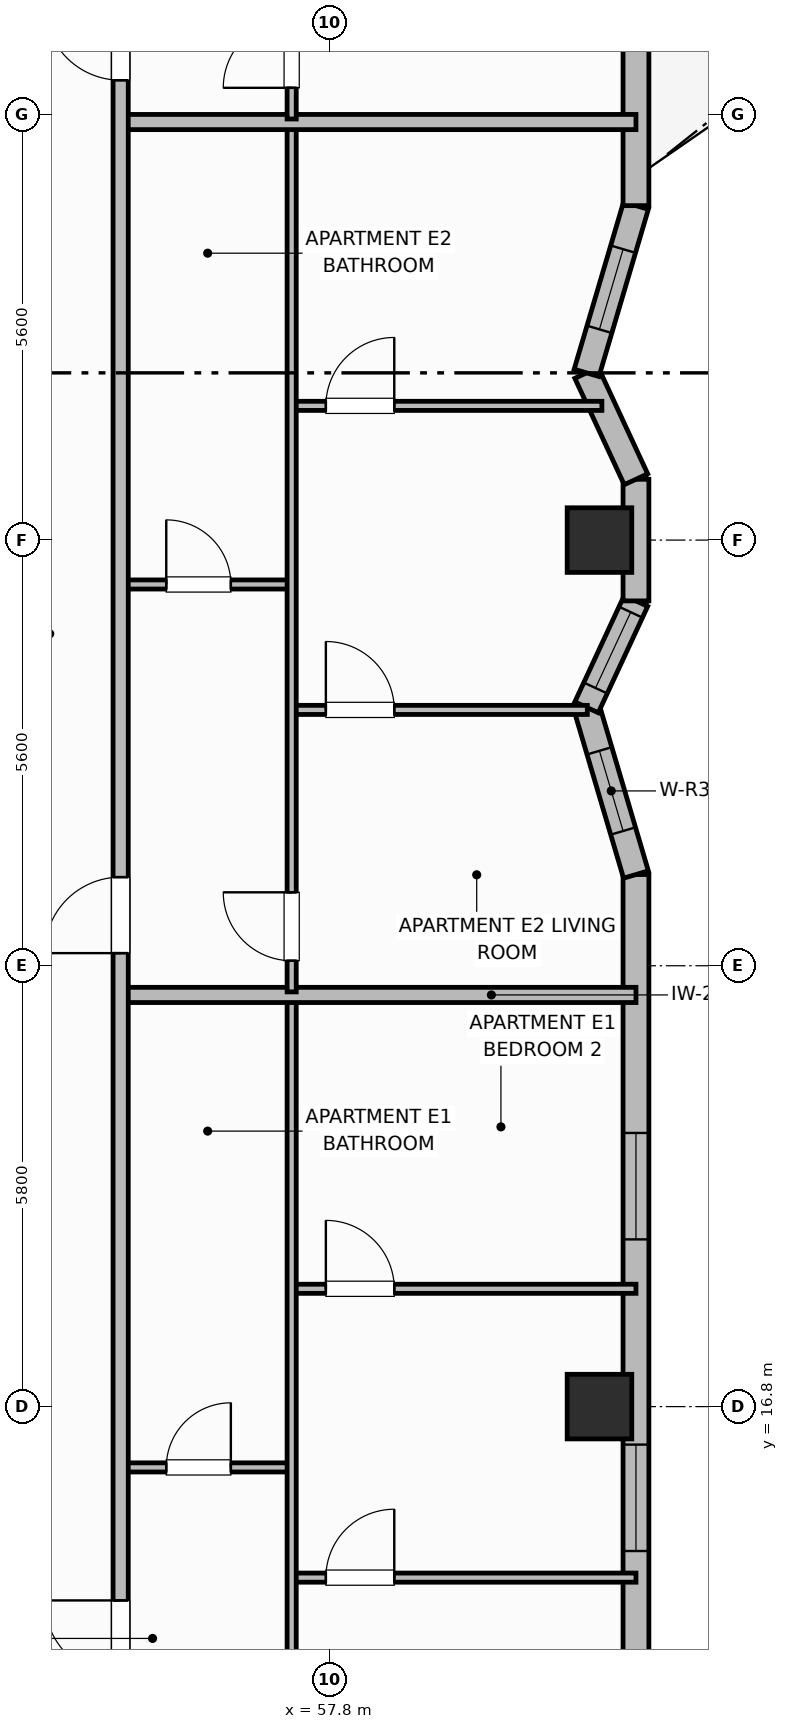
"""IFC4 building model, lengths in metres.
Left out: names, types, materials, properties, quantities, classifications, styles, units other than length and angle.
Written with IfcOpenShell. Run it as: python <this file> out.ifc"""

import sys

from ifc_helpers import new_model, si_unit, direction, frame, frame_2d, origin, origin_2d, place, context, subcontext, project, spatial, rectangle, extrude, element, fill, save


model = new_model("IFC4")
c1 = context("Model", 3, precision=1e-05, world=origin(), true_north=direction((0.0, 1.0)))
c2 = subcontext(c1, "Body", "Model", "MODEL_VIEW")
j1 = project(units=[si_unit("LENGTHUNIT", "METRE"), si_unit("PLANEANGLEUNIT", "RADIAN")], contexts=[c1])
p1 = place(None, origin())
s1 = spatial("IfcSite", under=j1, at=p1, CompositionType="ELEMENT")
p2 = place(p1, origin())
s2 = spatial("IfcBuilding", under=s1, at=p2, CompositionType="ELEMENT")
p3 = place(p2, frame((0.0, 0.0, 207.3)))
s3 = spatial("IfcBuildingStorey", under=s2, at=p3, CompositionType="ELEMENT", Elevation=207.3)
for number, where, z_axis, x_axis in (
    (1, (61.35, 16.8, 0.0), (0.0, 0.0, 1.0), (1.0, 0.0, 0.0)),
    (2, (61.35, 28.2, 0.0), (0.0, 0.0, 1.0), (1.0, 0.0, 0.0)),
):
    element("IfcColumn", number, at=place(p3, frame(where, z_axis=z_axis, x_axis=x_axis)), inside=s3, PredefinedType="COLUMN", context=c2, shape_type="SweptSolid", body=[
        extrude(rectangle(XDim=0.85, YDim=0.85, at=origin_2d()), origin(), (0.0, 0.0, 1.0), 3.7),
    ])
p4 = place(p3, frame((61.83, 10.5, 0.0), z_axis=(0.0, 0.0, 1.0), x_axis=(0.0, 1.0, 0.0)))
e3 = element("IfcWall", 3, at=p4, inside=s3, PredefinedType="SOLIDWALL", context=c2, shape_type="SweptSolid", body=[
    extrude(rectangle(XDim=13.3, YDim=0.34, at=frame_2d((6.65, 0.0))), origin(), (0.0, 0.0, 1.0), 2.72),
])
p5 = place(p4, frame((1.45, 0.0, 0.75)))
e4 = element("IfcOpeningElement", 4, at=p5, cuts=e3, PredefinedType="OPENING", context=c2, shape_type="SweptSolid", body=[
    extrude(rectangle(XDim=1.4, YDim=1.85, at=frame_2d((0.7, 0.925))), frame((0.0, 0.18, 0.0), z_axis=(0.0, -1.0, 0.0), x_axis=(1.0, 0.0, 0.0)), (0.0, 0.0, 1.0), 0.36),
])
p6 = place(p4, frame((4.4, 0.0, 0.71)))
e5 = element("IfcOpeningElement", 5, at=p6, cuts=e3, PredefinedType="OPENING", context=c2, shape_type="SweptSolid", body=[
    extrude(rectangle(XDim=1.4, YDim=1.85, at=frame_2d((0.7, 0.925))), frame((0.0, 0.18, 0.0), z_axis=(0.0, -1.0, 0.0), x_axis=(1.0, 0.0, 0.0)), (0.0, 0.0, 1.0), 0.36),
])
p7 = place(p4, frame((8.5, 0.0, 0.75)))
e6 = element("IfcOpeningElement", 6, at=p7, cuts=e3, PredefinedType="OPENING", context=c2, shape_type="SweptSolid", body=[
    extrude(rectangle(XDim=1.4, YDim=1.85, at=frame_2d((0.7, 0.925))), frame((0.0, 0.18, 0.0), z_axis=(0.0, -1.0, 0.0), x_axis=(1.0, 0.0, 0.0)), (0.0, 0.0, 1.0), 0.36),
])
p8 = place(p3, frame((61.83, 23.8, 0.0), z_axis=(0.0, 0.0, 1.0), x_axis=(-0.283410652833, 0.958998645391, 0.0)))
e7 = element("IfcWall", 7, at=p8, inside=s3, PredefinedType="SOLIDWALL", context=c2, shape_type="SweptSolid", body=[
    extrude(rectangle(XDim=2.294, YDim=0.34, at=frame_2d((1.147, 0.0))), origin(), (0.0, 0.0, 1.0), 2.72),
])
p9 = place(p8, frame((0.597, 0.0, 0.91)))
e8 = element("IfcOpeningElement", 8, at=p9, cuts=e7, PredefinedType="OPENING", context=c2, shape_type="SweptSolid", body=[
    extrude(rectangle(XDim=1.1, YDim=1.65, at=frame_2d((0.55, 0.825))), frame((0.0, 0.18, 0.0), z_axis=(0.0, -1.0, 0.0), x_axis=(1.0, 0.0, 0.0)), (0.0, 0.0, 1.0), 0.36),
])
p10 = place(p3, frame((61.18, 26.0, 0.0), z_axis=(0.0, 0.0, 1.0), x_axis=(0.421213543339, 0.906961493619, 0.0)))
e9 = element("IfcWall", 9, at=p10, inside=s3, PredefinedType="SOLIDWALL", context=c2, shape_type="SweptSolid", body=[
    extrude(rectangle(XDim=1.543, YDim=0.34, at=frame_2d((0.772, 0.0))), origin(), (0.0, 0.0, 1.0), 2.72),
])
p11 = place(p10, frame((0.28, 0.0, 0.91)))
e10 = element("IfcOpeningElement", 10, at=p11, cuts=e9, PredefinedType="OPENING", context=c2, shape_type="SweptSolid", body=[
    extrude(rectangle(XDim=1.1, YDim=1.65, at=frame_2d((0.55, 0.825))), frame((0.0, 0.18, 0.0), z_axis=(0.0, -1.0, 0.0), x_axis=(1.0, 0.0, 0.0)), (0.0, 0.0, 1.0), 0.36),
])
p12 = place(p3, frame((61.83, 27.4, 0.0), z_axis=(0.0, 0.0, 1.0), x_axis=(0.0, 1.0, 0.0)))
e11 = element("IfcWall", 11, at=p12, inside=s3, PredefinedType="SOLIDWALL", context=c2, shape_type="SweptSolid", body=[
    extrude(rectangle(XDim=1.6, YDim=0.34, at=frame_2d((0.8, 0.0))), origin(), (0.0, 0.0, 1.0), 2.72),
])
p13 = place(p3, frame((61.83, 29.0, 0.0), z_axis=(0.0, 0.0, 1.0), x_axis=(-0.421213543339, 0.906961493619, 0.0)))
e12 = element("IfcWall", 12, at=p13, inside=s3, PredefinedType="SOLIDWALL", context=c2, shape_type="SweptSolid", body=[
    extrude(rectangle(XDim=1.543, YDim=0.34, at=frame_2d((0.772, 0.0))), origin(), (0.0, 0.0, 1.0), 2.72),
])
p14 = place(p3, frame((61.18, 30.4, 0.0), z_axis=(0.0, 0.0, 1.0), x_axis=(0.283381730269, 0.959007192335, 0.0)))
e13 = element("IfcWall", 13, at=p14, inside=s3, PredefinedType="SOLIDWALL", context=c2, shape_type="SweptSolid", body=[
    extrude(rectangle(XDim=2.294, YDim=0.34, at=frame_2d((1.147, 0.0))), origin(), (0.0, 0.0, 1.0), 2.72),
])
p15 = place(p14, frame((0.597, 0.0, 0.91)))
e14 = element("IfcOpeningElement", 14, at=p15, cuts=e13, PredefinedType="OPENING", context=c2, shape_type="SweptSolid", body=[
    extrude(rectangle(XDim=1.1, YDim=1.65, at=frame_2d((0.55, 0.825))), frame((0.0, 0.18, 0.0), z_axis=(0.0, -1.0, 0.0), x_axis=(1.0, 0.0, 0.0)), (0.0, 0.0, 1.0), 0.36),
])
p16 = place(p3, frame((61.83, 32.6, 0.0), z_axis=(0.0, 0.0, 1.0), x_axis=(0.0, 1.0, 0.0)))
e15 = element("IfcWall", 15, at=p16, inside=s3, PredefinedType="SOLIDWALL", context=c2, shape_type="SweptSolid", body=[
    extrude(rectangle(XDim=13.3, YDim=0.34, at=frame_2d((6.65, 0.0))), origin(), (0.0, 0.0, 1.0), 2.72),
])
p17 = place(p16, frame((2.1, 0.0, 0.0)))
e16 = element("IfcOpeningElement", 16, at=p17, cuts=e15, PredefinedType="OPENING", context=c2, shape_type="SweptSolid", body=[
    extrude(rectangle(XDim=1.6, YDim=2.1, at=frame_2d((0.8, 1.05))), frame((0.0, 0.18, 0.0), z_axis=(0.0, -1.0, 0.0), x_axis=(1.0, 0.0, 0.0)), (0.0, 0.0, 1.0), 0.36),
])
p18 = place(p16, frame((7.48, 0.0, 0.71)))
e17 = element("IfcOpeningElement", 17, at=p18, cuts=e15, PredefinedType="OPENING", context=c2, shape_type="SweptSolid", body=[
    extrude(rectangle(XDim=1.4, YDim=1.85, at=frame_2d((0.7, 0.925))), frame((0.0, 0.18, 0.0), z_axis=(0.0, -1.0, 0.0), x_axis=(1.0, 0.0, 0.0)), (0.0, 0.0, 1.0), 0.36),
])
p19 = place(p16, frame((10.6, 0.0, 0.95)))
e18 = element("IfcOpeningElement", 18, at=p19, cuts=e15, PredefinedType="OPENING", context=c2, shape_type="SweptSolid", body=[
    extrude(rectangle(XDim=1.1, YDim=1.65, at=frame_2d((0.55, 0.825))), frame((0.0, 0.18, 0.0), z_axis=(0.0, -1.0, 0.0), x_axis=(1.0, 0.0, 0.0)), (0.0, 0.0, 1.0), 0.36),
])
p20 = place(p3, frame((55.05, 16.0, 0.0), z_axis=(0.0, 0.0, 1.0), x_axis=(1.0, 0.0, 0.0)))
e19 = element("IfcWall", 19, at=p20, inside=s3, PredefinedType="PARTITIONING", context=c2, shape_type="SweptSolid", body=[
    extrude(rectangle(XDim=2.25, YDim=0.12, at=frame_2d((1.125, 0.0))), origin(), (0.0, 0.0, 1.0), 2.55),
])
p21 = place(p20, frame((0.6, 0.0, 0.0)))
e20 = element("IfcOpeningElement", 20, at=p21, cuts=e19, PredefinedType="OPENING", context=c2, shape_type="SweptSolid", body=[
    extrude(rectangle(XDim=0.85, YDim=2.1, at=frame_2d((0.425, 1.05))), frame((0.0, 0.07, 0.0), z_axis=(0.0, -1.0, 0.0), x_axis=(1.0, 0.0, 0.0)), (0.0, 0.0, 1.0), 0.14),
])
p22 = place(p3, frame((57.3, 14.55, 0.0), z_axis=(0.0, 0.0, 1.0), x_axis=(1.0, 0.0, 0.0)))
e21 = element("IfcWall", 21, at=p22, inside=s3, PredefinedType="PARTITIONING", context=c2, shape_type="SweptSolid", body=[
    extrude(rectangle(XDim=4.53, YDim=0.12, at=frame_2d((2.265, 0.0))), origin(), (0.0, 0.0, 1.0), 2.55),
])
p23 = place(p22, frame((0.45, 0.0, 0.0)))
e22 = element("IfcOpeningElement", 22, at=p23, cuts=e21, PredefinedType="OPENING", context=c2, shape_type="SweptSolid", body=[
    extrude(rectangle(XDim=0.9, YDim=2.1, at=frame_2d((0.45, 1.05))), frame((0.0, 0.07, 0.0), z_axis=(0.0, -1.0, 0.0), x_axis=(1.0, 0.0, 0.0)), (0.0, 0.0, 1.0), 0.14),
])
p24 = place(p3, frame((57.3, 18.35, 0.0), z_axis=(0.0, 0.0, 1.0), x_axis=(1.0, 0.0, 0.0)))
e23 = element("IfcWall", 23, at=p24, inside=s3, PredefinedType="PARTITIONING", context=c2, shape_type="SweptSolid", body=[
    extrude(rectangle(XDim=4.53, YDim=0.12, at=frame_2d((2.265, 0.0))), origin(), (0.0, 0.0, 1.0), 2.55),
])
p25 = place(p24, frame((0.45, 0.0, 0.0)))
e24 = element("IfcOpeningElement", 24, at=p25, cuts=e23, PredefinedType="OPENING", context=c2, shape_type="SweptSolid", body=[
    extrude(rectangle(XDim=0.9, YDim=2.1, at=frame_2d((0.45, 1.05))), frame((0.0, 0.07, 0.0), z_axis=(0.0, -1.0, 0.0), x_axis=(1.0, 0.0, 0.0)), (0.0, 0.0, 1.0), 0.14),
])
p26 = place(p3, frame((57.3, 10.64, 0.0), z_axis=(0.0, 0.0, 1.0), x_axis=(0.0, 1.0, 0.0)))
e25 = element("IfcWall", 25, at=p26, inside=s3, PredefinedType="PARTITIONING", context=c2, shape_type="SweptSolid", body=[
    extrude(rectangle(XDim=11.536, YDim=0.12, at=frame_2d((5.768, 0.0))), origin(), (0.0, 0.0, 1.0), 2.55),
])
p27 = place(p26, frame((0.41, 0.0, 0.0)))
e26 = element("IfcOpeningElement", 26, at=p27, cuts=e25, PredefinedType="OPENING", context=c2, shape_type="SweptSolid", body=[
    extrude(rectangle(XDim=0.9, YDim=2.1, at=frame_2d((0.45, 1.05))), frame((0.0, 0.07, 0.0), z_axis=(0.0, -1.0, 0.0), x_axis=(1.0, 0.0, 0.0)), (0.0, 0.0, 1.0), 0.14),
])
p28 = place(p3, frame((55.05, 22.216, 0.0), z_axis=(0.0, 0.0, 1.0), x_axis=(1.0, 0.0, 0.0)))
e27 = element("IfcWall", 27, at=p28, inside=s3, PredefinedType="PARTITIONING", context=c2, shape_type="SweptSolid", body=[
    extrude(rectangle(XDim=6.78, YDim=0.2, at=frame_2d((3.39, 0.0))), origin(), (0.0, 0.0, 1.0), 2.55),
])
p29 = place(p3, frame((55.05, 27.616, 0.0), z_axis=(0.0, 0.0, 1.0), x_axis=(1.0, 0.0, 0.0)))
e28 = element("IfcWall", 28, at=p29, inside=s3, PredefinedType="PARTITIONING", context=c2, shape_type="SweptSolid", body=[
    extrude(rectangle(XDim=2.25, YDim=0.12, at=frame_2d((1.125, 0.0))), origin(), (0.0, 0.0, 1.0), 2.55),
])
p30 = place(p29, frame((0.6, 0.0, 0.0)))
e29 = element("IfcOpeningElement", 29, at=p30, cuts=e28, PredefinedType="OPENING", context=c2, shape_type="SweptSolid", body=[
    extrude(rectangle(XDim=0.85, YDim=2.1, at=frame_2d((0.425, 1.05))), frame((0.0, 0.07, 0.0), z_axis=(0.0, -1.0, 0.0), x_axis=(1.0, 0.0, 0.0)), (0.0, 0.0, 1.0), 0.14),
])
p31 = place(p3, frame((57.3, 25.966, 0.0), z_axis=(0.0, 0.0, 1.0), x_axis=(1.0, 0.0, 0.0)))
e30 = element("IfcWall", 30, at=p31, inside=s3, PredefinedType="PARTITIONING", context=c2, shape_type="SweptSolid", body=[
    extrude(rectangle(XDim=3.89, YDim=0.12, at=frame_2d((1.945, 0.0))), origin(), (0.0, 0.0, 1.0), 2.55),
])
p32 = place(p31, frame((0.45, 0.0, 0.0)))
e31 = element("IfcOpeningElement", 31, at=p32, cuts=e30, PredefinedType="OPENING", context=c2, shape_type="SweptSolid", body=[
    extrude(rectangle(XDim=0.9, YDim=2.1, at=frame_2d((0.45, 1.05))), frame((0.0, 0.07, 0.0), z_axis=(0.0, -1.0, 0.0), x_axis=(1.0, 0.0, 0.0)), (0.0, 0.0, 1.0), 0.14),
])
p33 = place(p3, frame((57.3, 29.966, 0.0), z_axis=(0.0, 0.0, 1.0), x_axis=(1.0, 0.0, 0.0)))
e32 = element("IfcWall", 32, at=p33, inside=s3, PredefinedType="PARTITIONING", context=c2, shape_type="SweptSolid", body=[
    extrude(rectangle(XDim=4.082, YDim=0.12, at=frame_2d((2.041, 0.0))), origin(), (0.0, 0.0, 1.0), 2.55),
])
p34 = place(p33, frame((0.45, 0.0, 0.0)))
e33 = element("IfcOpeningElement", 33, at=p34, cuts=e32, PredefinedType="OPENING", context=c2, shape_type="SweptSolid", body=[
    extrude(rectangle(XDim=0.9, YDim=2.1, at=frame_2d((0.45, 1.05))), frame((0.0, 0.07, 0.0), z_axis=(0.0, -1.0, 0.0), x_axis=(1.0, 0.0, 0.0)), (0.0, 0.0, 1.0), 0.14),
])
p35 = place(p3, frame((57.3, 22.256, 0.0), z_axis=(0.0, 0.0, 1.0), x_axis=(0.0, 1.0, 0.0)))
e34 = element("IfcWall", 34, at=p35, inside=s3, PredefinedType="PARTITIONING", context=c2, shape_type="SweptSolid", body=[
    extrude(rectangle(XDim=11.404, YDim=0.12, at=frame_2d((5.702, 0.0))), origin(), (0.0, 0.0, 1.0), 2.55),
])
p36 = place(p35, frame((0.41, 0.0, 0.0)))
e35 = element("IfcOpeningElement", 35, at=p36, cuts=e34, PredefinedType="OPENING", context=c2, shape_type="SweptSolid", body=[
    extrude(rectangle(XDim=0.9, YDim=2.1, at=frame_2d((0.45, 1.05))), frame((0.0, 0.07, 0.0), z_axis=(0.0, -1.0, 0.0), x_axis=(1.0, 0.0, 0.0)), (0.0, 0.0, 1.0), 0.14),
])
p37 = place(p3, frame((55.05, 33.7, 0.0), z_axis=(0.0, 0.0, 1.0), x_axis=(1.0, 0.0, 0.0)))
e36 = element("IfcWall", 36, at=p37, inside=s3, PredefinedType="PARTITIONING", context=c2, shape_type="SweptSolid", body=[
    extrude(rectangle(XDim=6.78, YDim=0.2, at=frame_2d((3.39, 0.0))), origin(), (0.0, 0.0, 1.0), 2.55),
])
p38 = place(p3, frame((57.3, 33.74, 0.0), z_axis=(0.0, 0.0, 1.0), x_axis=(0.0, 1.0, 0.0)))
e37 = element("IfcWall", 37, at=p38, inside=s3, PredefinedType="PARTITIONING", context=c2, shape_type="SweptSolid", body=[
    extrude(rectangle(XDim=12.02, YDim=0.12, at=frame_2d((6.01, 0.0))), origin(), (0.0, 0.0, 1.0), 2.55),
])
p39 = place(p38, frame((0.41, 0.0, 0.0)))
e38 = element("IfcOpeningElement", 38, at=p39, cuts=e37, PredefinedType="OPENING", context=c2, shape_type="SweptSolid", body=[
    extrude(rectangle(XDim=0.9, YDim=2.1, at=frame_2d((0.45, 1.05))), frame((0.0, 0.07, 0.0), z_axis=(0.0, -1.0, 0.0), x_axis=(1.0, 0.0, 0.0)), (0.0, 0.0, 1.0), 0.14),
])
p40 = place(p38, frame((10.185, 0.0, 0.0)))
e39 = element("IfcOpeningElement", 39, at=p40, cuts=e37, PredefinedType="OPENING", context=c2, shape_type="SweptSolid", body=[
    extrude(rectangle(XDim=0.82, YDim=2.08, at=frame_2d((0.41, 1.04))), frame((0.0, 0.07, 0.0), z_axis=(0.0, -1.0, 0.0), x_axis=(1.0, 0.0, 0.0)), (0.0, 0.0, 1.0), 0.14),
])
p41 = place(p3, frame((55.05, 10.6, 0.0), z_axis=(0.0, 0.0, 1.0), x_axis=(0.0, 1.0, 0.0)))
e40 = element("IfcWall", 40, at=p41, inside=s3, PredefinedType="PARTITIONING", context=c2, shape_type="SweptSolid", body=[
    extrude(rectangle(XDim=35.2, YDim=0.2, at=frame_2d((17.6, 0.0))), origin(), (0.0, 0.0, 1.0), 2.55),
])
p42 = place(p41, frame((2.65, 0.0, 0.0)))
e41 = element("IfcOpeningElement", 41, at=p42, cuts=e40, PredefinedType="OPENING", context=c2, shape_type="SweptSolid", body=[
    extrude(rectangle(XDim=1.0, YDim=2.15, at=frame_2d((0.5, 1.075))), frame((0.0, 0.11, 0.0), z_axis=(0.0, -1.0, 0.0), x_axis=(1.0, 0.0, 0.0)), (0.0, 0.0, 1.0), 0.22),
])
p43 = place(p41, frame((12.166, 0.0, 0.0)))
e42 = element("IfcOpeningElement", 42, at=p43, cuts=e40, PredefinedType="OPENING", context=c2, shape_type="SweptSolid", body=[
    extrude(rectangle(XDim=1.0, YDim=2.15, at=frame_2d((0.5, 1.075))), frame((0.0, 0.11, 0.0), z_axis=(0.0, -1.0, 0.0), x_axis=(1.0, 0.0, 0.0)), (0.0, 0.0, 1.0), 0.22),
])
p44 = place(p41, frame((23.65, 0.0, 0.0)))
e43 = element("IfcOpeningElement", 43, at=p44, cuts=e40, PredefinedType="OPENING", context=c2, shape_type="SweptSolid", body=[
    extrude(rectangle(XDim=1.0, YDim=2.15, at=frame_2d((0.5, 1.075))), frame((0.0, 0.11, 0.0), z_axis=(0.0, -1.0, 0.0), x_axis=(1.0, 0.0, 0.0)), (0.0, 0.0, 1.0), 0.22),
])
p45 = place(p6, origin())
e44 = element("IfcWindow", 44, at=p45, inside=s3, PartitioningType="SINGLE_PANEL", PredefinedType="WINDOW", context=c2, shape_type="SweptSolid", body=[
    extrude(rectangle(XDim=1.4, YDim=1.85, at=frame_2d((0.7, 0.925))), frame((0.0, 0.03, 0.0), z_axis=(0.0, -1.0, 0.0), x_axis=(1.0, 0.0, 0.0)), (0.0, 0.0, 1.0), 0.06),
])
fill(e5, e44)
p46 = place(p7, origin())
e45 = element("IfcWindow", 45, at=p46, inside=s3, PartitioningType="SINGLE_PANEL", PredefinedType="WINDOW", context=c2, shape_type="SweptSolid", body=[
    extrude(rectangle(XDim=1.4, YDim=1.85, at=frame_2d((0.7, 0.925))), frame((0.0, 0.03, 0.0), z_axis=(0.0, -1.0, 0.0), x_axis=(1.0, 0.0, 0.0)), (0.0, 0.0, 1.0), 0.06),
])
fill(e6, e45)
p47 = place(p9, origin())
e46 = element("IfcWindow", 46, at=p47, inside=s3, PartitioningType="SINGLE_PANEL", PredefinedType="WINDOW", context=c2, shape_type="SweptSolid", body=[
    extrude(rectangle(XDim=1.1, YDim=1.65, at=frame_2d((0.55, 0.825))), frame((0.0, 0.03, 0.0), z_axis=(0.0, -1.0, 0.0), x_axis=(1.0, 0.0, 0.0)), (0.0, 0.0, 1.0), 0.06),
])
fill(e8, e46)
p48 = place(p11, origin())
e47 = element("IfcWindow", 47, at=p48, inside=s3, PartitioningType="SINGLE_PANEL", PredefinedType="WINDOW", context=c2, shape_type="SweptSolid", body=[
    extrude(rectangle(XDim=1.1, YDim=1.65, at=frame_2d((0.55, 0.825))), frame((0.0, 0.03, 0.0), z_axis=(0.0, -1.0, 0.0), x_axis=(1.0, 0.0, 0.0)), (0.0, 0.0, 1.0), 0.06),
])
fill(e10, e47)
p49 = place(p15, origin())
e48 = element("IfcWindow", 48, at=p49, inside=s3, PartitioningType="SINGLE_PANEL", PredefinedType="WINDOW", context=c2, shape_type="SweptSolid", body=[
    extrude(rectangle(XDim=1.1, YDim=1.65, at=frame_2d((0.55, 0.825))), frame((0.0, 0.03, 0.0), z_axis=(0.0, -1.0, 0.0), x_axis=(1.0, 0.0, 0.0)), (0.0, 0.0, 1.0), 0.06),
])
fill(e14, e48)
p50 = place(p21, origin())
e49 = element("IfcDoor", 49, at=p50, inside=s3, OperationType="SINGLE_SWING_RIGHT", PredefinedType="DOOR", context=c2, shape_type="SweptSolid", body=[
    extrude(rectangle(XDim=0.85, YDim=2.1, at=frame_2d((0.425, 1.05))), frame((0.0, 0.025, 0.0), z_axis=(0.0, -1.0, 0.0), x_axis=(1.0, 0.0, 0.0)), (0.0, 0.0, 1.0), 0.05),
])
fill(e20, e49)
p51 = place(p23, origin())
e50 = element("IfcDoor", 50, at=p51, inside=s3, OperationType="SINGLE_SWING_RIGHT", PredefinedType="DOOR", context=c2, shape_type="SweptSolid", body=[
    extrude(rectangle(XDim=0.9, YDim=2.1, at=frame_2d((0.45, 1.05))), frame((0.0, 0.025, 0.0), z_axis=(0.0, -1.0, 0.0), x_axis=(1.0, 0.0, 0.0)), (0.0, 0.0, 1.0), 0.05),
])
fill(e22, e50)
p52 = place(p25, origin())
e51 = element("IfcDoor", 51, at=p52, inside=s3, OperationType="SINGLE_SWING_LEFT", PredefinedType="DOOR", context=c2, shape_type="SweptSolid", body=[
    extrude(rectangle(XDim=0.9, YDim=2.1, at=frame_2d((0.45, 1.05))), frame((0.0, 0.025, 0.0), z_axis=(0.0, -1.0, 0.0), x_axis=(1.0, 0.0, 0.0)), (0.0, 0.0, 1.0), 0.05),
])
fill(e24, e51)
p53 = place(p30, origin())
e52 = element("IfcDoor", 52, at=p53, inside=s3, OperationType="SINGLE_SWING_LEFT", PredefinedType="DOOR", context=c2, shape_type="SweptSolid", body=[
    extrude(rectangle(XDim=0.85, YDim=2.1, at=frame_2d((0.425, 1.05))), frame((0.0, 0.025, 0.0), z_axis=(0.0, -1.0, 0.0), x_axis=(1.0, 0.0, 0.0)), (0.0, 0.0, 1.0), 0.05),
])
fill(e29, e52)
p54 = place(p32, origin())
e53 = element("IfcDoor", 53, at=p54, inside=s3, OperationType="SINGLE_SWING_LEFT", PredefinedType="DOOR", context=c2, shape_type="SweptSolid", body=[
    extrude(rectangle(XDim=0.9, YDim=2.1, at=frame_2d((0.45, 1.05))), frame((0.0, 0.025, 0.0), z_axis=(0.0, -1.0, 0.0), x_axis=(1.0, 0.0, 0.0)), (0.0, 0.0, 1.0), 0.05),
])
fill(e31, e53)
p55 = place(p34, origin())
e54 = element("IfcDoor", 54, at=p55, inside=s3, OperationType="SINGLE_SWING_RIGHT", PredefinedType="DOOR", context=c2, shape_type="SweptSolid", body=[
    extrude(rectangle(XDim=0.9, YDim=2.1, at=frame_2d((0.45, 1.05))), frame((0.0, 0.025, 0.0), z_axis=(0.0, -1.0, 0.0), x_axis=(1.0, 0.0, 0.0)), (0.0, 0.0, 1.0), 0.05),
])
fill(e33, e54)
p56 = place(p36, origin())
e55 = element("IfcDoor", 55, at=p56, inside=s3, OperationType="SINGLE_SWING_RIGHT", PredefinedType="DOOR", context=c2, shape_type="SweptSolid", body=[
    extrude(rectangle(XDim=0.9, YDim=2.1, at=frame_2d((0.45, 1.05))), frame((0.0, 0.025, 0.0), z_axis=(0.0, -1.0, 0.0), x_axis=(1.0, 0.0, 0.0)), (0.0, 0.0, 1.0), 0.05),
])
fill(e35, e55)
p57 = place(p39, origin())
e56 = element("IfcDoor", 56, at=p57, inside=s3, OperationType="SINGLE_SWING_LEFT", PredefinedType="DOOR", context=c2, shape_type="SweptSolid", body=[
    extrude(rectangle(XDim=0.9, YDim=2.1, at=frame_2d((0.45, 1.05))), frame((0.0, 0.025, 0.0), z_axis=(0.0, -1.0, 0.0), x_axis=(1.0, 0.0, 0.0)), (0.0, 0.0, 1.0), 0.05),
])
fill(e38, e56)
p58 = place(p42, origin())
e57 = element("IfcDoor", 57, at=p58, inside=s3, OperationType="SINGLE_SWING_RIGHT", PredefinedType="DOOR", context=c2, shape_type="SweptSolid", body=[
    extrude(rectangle(XDim=1.0, YDim=2.15, at=frame_2d((0.5, 1.075))), frame((0.0, 0.025, 0.0), z_axis=(0.0, -1.0, 0.0), x_axis=(1.0, 0.0, 0.0)), (0.0, 0.0, 1.0), 0.05),
])
fill(e41, e57)
p59 = place(p43, origin())
e58 = element("IfcDoor", 58, at=p59, inside=s3, OperationType="SINGLE_SWING_LEFT", PredefinedType="DOOR", context=c2, shape_type="SweptSolid", body=[
    extrude(rectangle(XDim=1.0, YDim=2.15, at=frame_2d((0.5, 1.075))), frame((0.0, 0.025, 0.0), z_axis=(0.0, -1.0, 0.0), x_axis=(1.0, 0.0, 0.0)), (0.0, 0.0, 1.0), 0.05),
])
fill(e42, e58)
p60 = place(p44, origin())
e59 = element("IfcDoor", 59, at=p60, inside=s3, OperationType="SINGLE_SWING_RIGHT", PredefinedType="DOOR", context=c2, shape_type="SweptSolid", body=[
    extrude(rectangle(XDim=1.0, YDim=2.15, at=frame_2d((0.5, 1.075))), frame((0.0, 0.025, 0.0), z_axis=(0.0, -1.0, 0.0), x_axis=(1.0, 0.0, 0.0)), (0.0, 0.0, 1.0), 0.05),
])
fill(e43, e59)
save(model, sys.argv[1])
